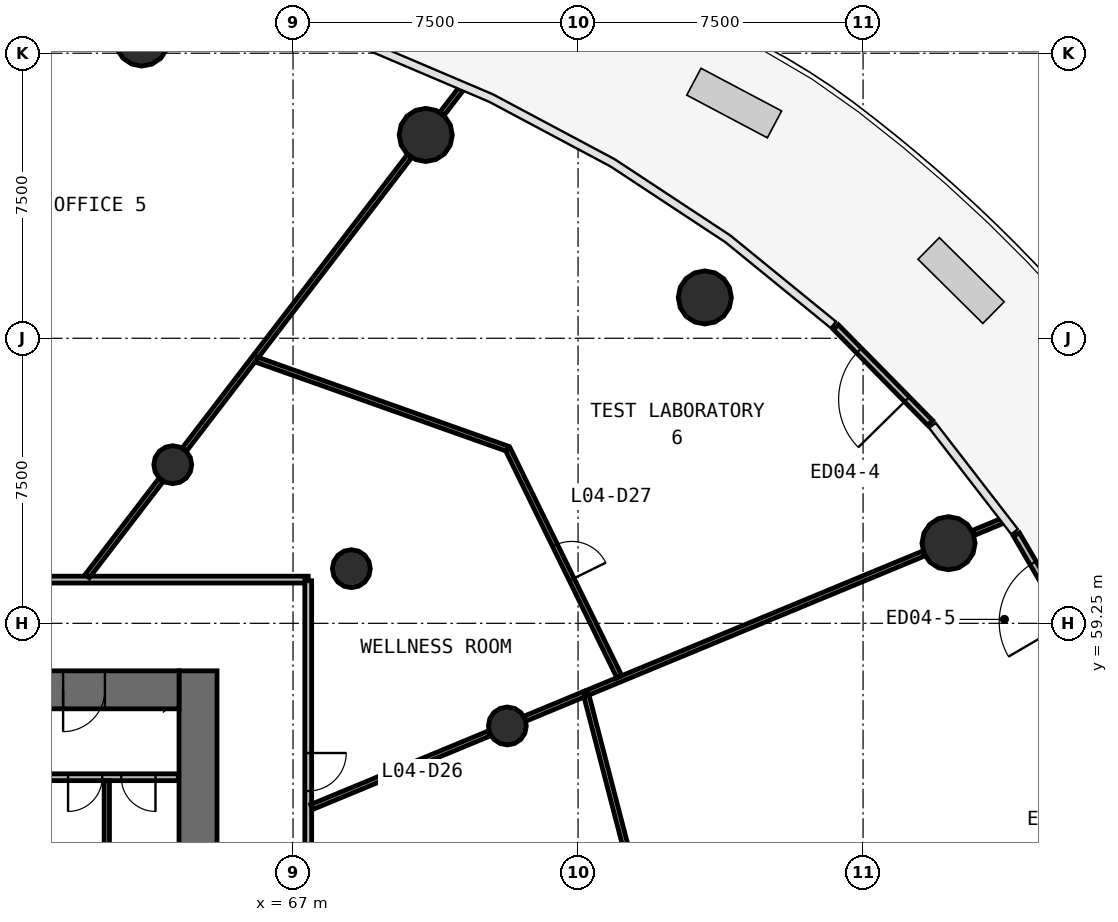
"""IFC4 building model, lengths in metres.
Left out: names, types, materials, properties, quantities, classifications, styles, units other than length and angle.
Written with IfcOpenShell. Run it as: python <this file> out.ifc"""

import sys

from ifc_helpers import new_model, si_unit, direction, frame, frame_2d, origin, origin_2d, place, context, subcontext, project, spatial, rectangle, circle, extrude, source, transform, mapped, element, fill, save


model = new_model("IFC4")
c1 = context("Model", 3, precision=1e-05, world=origin(), true_north=direction((0.0, 1.0)))
c2 = subcontext(c1, "Body", "Model", "MODEL_VIEW")
j1 = project(units=[si_unit("LENGTHUNIT", "METRE"), si_unit("PLANEANGLEUNIT", "RADIAN")], contexts=[c1])
p1 = place(None, origin())
s1 = spatial("IfcSite", under=j1, at=p1, CompositionType="ELEMENT")
p2 = place(p1, origin())
s2 = spatial("IfcBuilding", under=s1, at=p2, CompositionType="ELEMENT")
p3 = place(p2, frame((0.0, 0.0, 18.2)))
s3 = spatial("IfcBuildingStorey", under=s2, at=p3, CompositionType="ELEMENT", Elevation=18.2)
p4 = place(p3, frame((64.5, 38.0, 0.0), z_axis=(0.0, 0.0, 1.0), x_axis=(0.0, 1.0, 0.0)))
e1 = element("IfcWall", 1, at=p4, inside=s3, PredefinedType="SHEAR", context=c2, shape_type="SweptSolid", body=[
    extrude(rectangle(XDim=20.0, YDim=1.0, at=frame_2d((10.0, 0.0))), origin(), (0.0, 0.0, 1.0), 4.4),
])
p5 = place(p4, frame((9.1, 0.0, 0.0)))
e2 = element("IfcOpeningElement", 2, at=p5, cuts=e1, PredefinedType="OPENING", context=c2, shape_type="SweptSolid", body=[
    extrude(rectangle(XDim=1.8, YDim=2.1, at=frame_2d((0.9, 1.05))), frame((0.0, 0.51, 0.0), z_axis=(0.0, -1.0, 0.0), x_axis=(1.0, 0.0, 0.0)), (0.0, 0.0, 1.0), 1.02),
])
p6 = place(p3, frame((64.0, 57.5, 0.0), z_axis=(0.0, 0.0, 1.0), x_axis=(-1.0, 0.0, 0.0)))
e3 = element("IfcWall", 3, at=p6, inside=s3, PredefinedType="SHEAR", context=c2, shape_type="SweptSolid", body=[
    extrude(rectangle(XDim=24.0, YDim=1.0, at=frame_2d((12.0, 0.0))), origin(), (0.0, 0.0, 1.0), 4.4),
])
p7 = place(p6, frame((21.45, 0.0, 0.0)))
e4 = element("IfcOpeningElement", 4, at=p7, cuts=e3, PredefinedType="OPENING", context=c2, shape_type="SweptSolid", body=[
    extrude(rectangle(XDim=1.1, YDim=2.1, at=frame_2d((0.55, 1.05))), frame((0.0, 0.51, 0.0), z_axis=(0.0, -1.0, 0.0), x_axis=(1.0, 0.0, 0.0)), (0.0, 0.0, 1.0), 1.02),
])
p8 = place(p6, frame((1.95, 0.0, 0.0)))
e5 = element("IfcOpeningElement", 5, at=p8, cuts=e3, PredefinedType="OPENING", context=c2, shape_type="SweptSolid", body=[
    extrude(rectangle(XDim=1.1, YDim=2.1, at=frame_2d((0.55, 1.05))), frame((0.0, 0.51, 0.0), z_axis=(0.0, -1.0, 0.0), x_axis=(1.0, 0.0, 0.0)), (0.0, 0.0, 1.0), 1.02),
])
m1 = source(origin(), c2, "Body", "SweptSolid", [
    extrude(circle(Radius=0.7, at=origin_2d()), origin(), (0.0, 0.0, 1.0), 4.4),
])
for number, where, z_axis, x_axis in (
    (6, (84.249, 61.358, 0.0), (0.0, 0.0, 1.0), (1.0, 0.0, 0.0)),
    (7, (77.836, 67.824, 0.0), (0.0, 0.0, 1.0), (1.0, 0.0, 0.0)),
    (8, (70.492, 72.1, 0.0), (0.0, 0.0, 1.0), (1.0, 0.0, 0.0)),
    (9, (63.023, 74.611, 0.0), (0.0, 0.0, 1.0), (1.0, 0.0, 0.0)),
):
    element("IfcColumn", number, at=place(p3, frame(where, z_axis=z_axis, x_axis=x_axis)), inside=s3, PredefinedType="COLUMN", context=c2, shape_type="MappedRepresentation", body=[
        mapped(m1, transform((0.0, 0.0, 0.0), scale=1.0)),
    ])
m2 = source(origin(), c2, "Body", "SweptSolid", [
    extrude(circle(Radius=0.5, at=origin_2d()), origin(), (0.0, 0.0, 1.0), 4.4),
])
for number, where, z_axis, x_axis in (
    (10, (72.639, 56.549, 0.0), (0.0, 0.0, 1.0), (1.0, 0.0, 0.0)),
    (11, (68.535, 60.688, 0.0), (0.0, 0.0, 1.0), (1.0, 0.0, 0.0)),
    (12, (63.835, 63.424, 0.0), (0.0, 0.0, 1.0), (1.0, 0.0, 0.0)),
):
    element("IfcColumn", number, at=place(p3, frame(where, z_axis=z_axis, x_axis=x_axis)), inside=s3, PredefinedType="COLUMN", context=c2, shape_type="MappedRepresentation", body=[
        mapped(m2, transform((0.0, 0.0, 0.0), scale=1.0)),
    ])
p9 = place(p3, frame((87.819, 58.532, 0.0), z_axis=(0.0, 0.0, 1.0), x_axis=(-0.50395689343, 0.863728805566, 0.0)))
e13 = element("IfcWall", 13, at=p9, inside=s3, PredefinedType="STANDARD", context=c2, shape_type="SweptSolid", body=[
    extrude(rectangle(XDim=3.535, YDim=0.18, at=frame_2d((1.768, 0.0))), origin(), (0.0, 0.0, 1.0), 3.95),
])
p10 = place(p9, frame((0.868, 0.0, 0.0)))
e14 = element("IfcOpeningElement", 14, at=p10, cuts=e13, PredefinedType="OPENING", context=c2, shape_type="SweptSolid", body=[
    extrude(rectangle(XDim=1.8, YDim=2.4, at=frame_2d((0.9, 1.2))), frame((0.0, 0.1, 0.0), z_axis=(0.0, -1.0, 0.0), x_axis=(1.0, 0.0, 0.0)), (0.0, 0.0, 1.0), 0.2),
])
p11 = place(p3, frame((83.765, 64.525, 0.0), z_axis=(0.0, 0.0, 1.0), x_axis=(-0.701631219798, 0.712540266514, 0.0)))
e15 = element("IfcWall", 15, at=p11, inside=s3, PredefinedType="STANDARD", context=c2, shape_type="SweptSolid", body=[
    extrude(rectangle(XDim=3.536, YDim=0.18, at=frame_2d((1.768, 0.0))), origin(), (0.0, 0.0, 1.0), 3.95),
])
p12 = place(p11, frame((0.868, 0.0, 0.0)))
e16 = element("IfcOpeningElement", 16, at=p12, cuts=e15, PredefinedType="OPENING", context=c2, shape_type="SweptSolid", body=[
    extrude(rectangle(XDim=1.8, YDim=2.4, at=frame_2d((0.9, 1.2))), frame((0.0, 0.1, 0.0), z_axis=(0.0, -1.0, 0.0), x_axis=(1.0, 0.0, 0.0)), (0.0, 0.0, 1.0), 0.2),
])
p13 = place(p3, frame((36.6, 60.4, 0.0), z_axis=(0.0, 0.0, 1.0), x_axis=(1.0, 0.0, 0.0)))
e17 = element("IfcWall", 17, at=p13, inside=s3, PredefinedType="PARTITIONING", context=c2, shape_type="SweptSolid", body=[
    extrude(rectangle(XDim=30.8, YDim=0.18, at=frame_2d((15.4, 0.0))), origin(), (0.0, 0.0, 1.0), 3.15),
])
p14 = place(p13, frame((17.35, 0.0, 0.0)))
e18 = element("IfcOpeningElement", 18, at=p14, cuts=e17, PredefinedType="OPENING", context=c2, shape_type="SweptSolid", body=[
    extrude(rectangle(XDim=1.0, YDim=2.1, at=frame_2d((0.5, 1.05))), frame((0.0, 0.1, 0.0), z_axis=(0.0, -1.0, 0.0), x_axis=(1.0, 0.0, 0.0)), (0.0, 0.0, 1.0), 0.2),
])
p15 = place(p13, frame((14.85, 0.0, 0.0)))
e19 = element("IfcOpeningElement", 19, at=p15, cuts=e17, PredefinedType="OPENING", context=c2, shape_type="SweptSolid", body=[
    extrude(rectangle(XDim=0.9, YDim=2.1, at=frame_2d((0.45, 1.05))), frame((0.0, 0.1, 0.0), z_axis=(0.0, -1.0, 0.0), x_axis=(1.0, 0.0, 0.0)), (0.0, 0.0, 1.0), 0.2),
])
p16 = place(p13, frame((12.65, 0.0, 0.0)))
e20 = element("IfcOpeningElement", 20, at=p16, cuts=e17, PredefinedType="OPENING", context=c2, shape_type="SweptSolid", body=[
    extrude(rectangle(XDim=0.9, YDim=2.1, at=frame_2d((0.45, 1.05))), frame((0.0, 0.1, 0.0), z_axis=(0.0, -1.0, 0.0), x_axis=(1.0, 0.0, 0.0)), (0.0, 0.0, 1.0), 0.2),
])
p17 = place(p13, frame((8.95, 0.0, 0.0)))
e21 = element("IfcOpeningElement", 21, at=p17, cuts=e17, PredefinedType="OPENING", context=c2, shape_type="SweptSolid", body=[
    extrude(rectangle(XDim=1.0, YDim=2.1, at=frame_2d((0.5, 1.05))), frame((0.0, 0.1, 0.0), z_axis=(0.0, -1.0, 0.0), x_axis=(1.0, 0.0, 0.0)), (0.0, 0.0, 1.0), 0.2),
])
p18 = place(p3, frame((67.4, 60.37, 0.0), z_axis=(0.0, 0.0, 1.0), x_axis=(0.0, -1.0, 0.0)))
e22 = element("IfcWall", 22, at=p18, inside=s3, PredefinedType="PARTITIONING", context=c2, shape_type="SweptSolid", body=[
    extrude(rectangle(XDim=23.583, YDim=0.18, at=frame_2d((11.791, 0.0))), origin(), (0.0, 0.0, 1.0), 3.15),
])
p19 = place(p18, frame((11.333, 0.0, 0.0)))
e23 = element("IfcOpeningElement", 23, at=p19, cuts=e22, PredefinedType="OPENING", context=c2, shape_type="SweptSolid", body=[
    extrude(rectangle(XDim=1.0, YDim=2.1, at=frame_2d((0.5, 1.05))), frame((0.0, 0.1, 0.0), z_axis=(0.0, -1.0, 0.0), x_axis=(1.0, 0.0, 0.0)), (0.0, 0.0, 1.0), 0.2),
])
p20 = place(p18, frame((4.532, 0.0, 0.0)))
e24 = element("IfcOpeningElement", 24, at=p20, cuts=e22, PredefinedType="OPENING", context=c2, shape_type="SweptSolid", body=[
    extrude(rectangle(XDim=1.0, YDim=2.1, at=frame_2d((0.5, 1.05))), frame((0.0, 0.1, 0.0), z_axis=(0.0, -1.0, 0.0), x_axis=(1.0, 0.0, 0.0)), (0.0, 0.0, 1.0), 0.2),
])
p21 = place(p3, frame((63.98, 55.2, 0.0), z_axis=(0.0, 0.0, 1.0), x_axis=(-1.0, 0.0, 0.0)))
e25 = element("IfcWall", 25, at=p21, inside=s3, PredefinedType="PARTITIONING", context=c2, shape_type="SweptSolid", body=[
    extrude(rectangle(XDim=3.75, YDim=0.18, at=frame_2d((1.875, 0.0))), origin(), (0.0, 0.0, 1.0), 3.95),
])
p22 = place(p21, frame((2.0, 0.0, 0.0)))
e26 = element("IfcOpeningElement", 26, at=p22, cuts=e25, PredefinedType="OPENING", context=c2, shape_type="SweptSolid", body=[
    extrude(rectangle(XDim=0.9, YDim=2.1, at=frame_2d((0.45, 1.05))), frame((0.0, 0.1, 0.0), z_axis=(0.0, -1.0, 0.0), x_axis=(1.0, 0.0, 0.0)), (0.0, 0.0, 1.0), 0.2),
])
p23 = place(p21, frame((0.6, 0.0, 0.0)))
e27 = element("IfcOpeningElement", 27, at=p23, cuts=e25, PredefinedType="OPENING", context=c2, shape_type="SweptSolid", body=[
    extrude(rectangle(XDim=0.9, YDim=2.1, at=frame_2d((0.45, 1.05))), frame((0.0, 0.1, 0.0), z_axis=(0.0, -1.0, 0.0), x_axis=(1.0, 0.0, 0.0)), (0.0, 0.0, 1.0), 0.2),
])
p24 = place(p3, frame((70.064, 71.541, 0.0), z_axis=(0.0, 0.0, 1.0), x_axis=(-0.608770295053, -0.793346537057, 0.0)))
e28 = element("IfcWall", 28, at=p24, inside=s3, PredefinedType="PARTITIONING", context=c2, shape_type="SweptSolid", body=[
    extrude(rectangle(XDim=9.727, YDim=0.14, at=frame_2d((4.864, 0.0))), origin(), (0.0, 0.0, 1.0), 3.15),
])
p25 = place(p3, frame((74.704, 57.404, 0.0), z_axis=(0.0, 0.0, 1.0), x_axis=(0.923875564014, 0.382693013024, 0.0)))
e29 = element("IfcWall", 29, at=p25, inside=s3, PredefinedType="PARTITIONING", context=c2, shape_type="SweptSolid", body=[
    extrude(rectangle(XDim=9.626, YDim=0.14, at=frame_2d((4.813, 0.0))), origin(), (0.0, 0.0, 1.0), 3.15),
])
p26 = place(p3, frame((72.647, 63.843, 0.0), z_axis=(0.0, 0.0, 1.0), x_axis=(-0.942402239282, 0.33448171758, 0.0)))
e30 = element("IfcWall", 30, at=p26, inside=s3, PredefinedType="PARTITIONING", context=c2, shape_type="SweptSolid", body=[
    extrude(rectangle(XDim=7.007, YDim=0.14, at=frame_2d((3.503, 0.0))), origin(), (0.0, 0.0, 1.0), 3.15),
])
p27 = place(p3, frame((72.66, 63.816, 0.0), z_axis=(0.0, 0.0, 1.0), x_axis=(0.44010555344, -0.897946046169, 0.0)))
e31 = element("IfcWall", 31, at=p27, inside=s3, PredefinedType="PARTITIONING", context=c2, shape_type="SweptSolid", body=[
    extrude(rectangle(XDim=6.649, YDim=0.14, at=frame_2d((3.324, 0.0))), origin(), (0.0, 0.0, 1.0), 3.15),
])
p28 = place(p27, frame((2.799, 0.0, 0.0)))
e32 = element("IfcOpeningElement", 32, at=p28, cuts=e31, PredefinedType="OPENING", context=c2, shape_type="SweptSolid", body=[
    extrude(rectangle(XDim=1.0, YDim=2.1, at=frame_2d((0.5, 1.05))), frame((0.0, 0.08, 0.0), z_axis=(0.0, -1.0, 0.0), x_axis=(1.0, 0.0, 0.0)), (0.0, 0.0, 1.0), 0.16),
])
p29 = place(p3, frame((76.316, 51.201, 0.0), z_axis=(0.0, 0.0, 1.0), x_axis=(-0.251404417417, 0.967882130687, 0.0)))
e33 = element("IfcWall", 33, at=p29, inside=s3, PredefinedType="PARTITIONING", context=c2, shape_type="SweptSolid", body=[
    extrude(rectangle(XDim=6.379, YDim=0.14, at=frame_2d((3.189, 0.0))), origin(), (0.0, 0.0, 1.0), 3.15),
])
p30 = place(p3, frame((67.49, 54.416, 0.0), z_axis=(0.0, 0.0, 1.0), x_axis=(0.923890025086, 0.382658100067, 0.0)))
e34 = element("IfcWall", 34, at=p30, inside=s3, PredefinedType="PARTITIONING", context=c2, shape_type="SweptSolid", body=[
    extrude(rectangle(XDim=5.068, YDim=0.14, at=frame_2d((2.534, 0.0))), origin(), (0.0, 0.0, 1.0), 3.15),
])
p31 = place(p3, frame((61.584, 60.49, 0.0), z_axis=(0.0, 0.0, 1.0), x_axis=(0.60874605662, 0.793365135703, 0.0)))
e35 = element("IfcWall", 35, at=p31, inside=s3, PredefinedType="PARTITIONING", context=c2, shape_type="SweptSolid", body=[
    extrude(rectangle(XDim=3.194, YDim=0.14, at=frame_2d((1.597, 0.0))), origin(), (0.0, 0.0, 1.0), 3.15),
])
p32 = place(p3, frame((62.1, 52.4, 0.0), z_axis=(0.0, 0.0, 1.0), x_axis=(0.0, 1.0, 0.0)))
e36 = element("IfcWall", 36, at=p32, inside=s3, PredefinedType="PARTITIONING", context=c2, shape_type="SweptSolid", body=[
    extrude(rectangle(XDim=2.71, YDim=0.14, at=frame_2d((1.355, 0.0))), origin(), (0.0, 0.0, 1.0), 3.15),
])
p33 = place(p3, frame((73.106, 56.742, 0.0), z_axis=(0.0, 0.0, 1.0), x_axis=(0.923810256597, 0.38285063642, 0.0)))
e37 = element("IfcWall", 37, at=p33, inside=s3, PredefinedType="PARTITIONING", context=c2, shape_type="SweptSolid", body=[
    extrude(rectangle(XDim=1.7, YDim=0.14, at=frame_2d((0.85, 0.0))), origin(), (0.0, 0.0, 1.0), 3.15),
])
p34 = place(p3, frame((70.921, 72.658, 0.0), z_axis=(0.0, 0.0, 1.0), x_axis=(0.608939798959, 0.793216440351, 0.0)))
e38 = element("IfcWall", 38, at=p34, inside=s3, PredefinedType="PARTITIONING", context=c2, shape_type="SweptSolid", body=[
    extrude(rectangle(XDim=0.827, YDim=0.14, at=frame_2d((0.413, 0.0))), origin(), (0.0, 0.0, 1.0), 3.15),
])
p35 = place(p3, frame((84.9, 61.628, 0.0), z_axis=(0.0, 0.0, 1.0), x_axis=(0.923846977396, 0.382762017913, 0.0)))
e39 = element("IfcWall", 39, at=p35, inside=s3, PredefinedType="PARTITIONING", context=c2, shape_type="SweptSolid", body=[
    extrude(rectangle(XDim=0.823, YDim=0.14, at=frame_2d((0.412, 0.0))), origin(), (0.0, 0.0, 1.0), 3.15),
])
m3 = source(origin(), c2, "Body", "SweptSolid", [
    extrude(rectangle(XDim=1.8, YDim=2.4, at=frame_2d((0.9, 1.2))), frame((0.0, 0.025, 0.0), z_axis=(0.0, -1.0, 0.0), x_axis=(1.0, 0.0, 0.0)), (0.0, 0.0, 1.0), 0.05),
])
p36 = place(p10, origin())
e40 = element("IfcDoor", 40, at=p36, inside=s3, OperationType="DOUBLE_DOOR_SINGLE_SWING", PredefinedType="DOOR", context=c2, shape_type="MappedRepresentation", body=[
    mapped(m3, transform((0.0, 0.0, 0.0), scale=1.0)),
])
fill(e14, e40)
p37 = place(p12, origin())
e41 = element("IfcDoor", 41, at=p37, inside=s3, OperationType="DOUBLE_DOOR_SINGLE_SWING", PredefinedType="DOOR", context=c2, shape_type="MappedRepresentation", body=[
    mapped(m3, transform((0.0, 0.0, 0.0), scale=1.0)),
])
fill(e16, e41)
m4 = source(origin(), c2, "Body", "SweptSolid", [
    extrude(rectangle(XDim=1.1, YDim=2.1, at=frame_2d((0.55, 1.05))), frame((0.0, 0.025, 0.0), z_axis=(0.0, -1.0, 0.0), x_axis=(1.0, 0.0, 0.0)), (0.0, 0.0, 1.0), 0.05),
])
p38 = place(p8, origin())
e42 = element("IfcDoor", 42, at=p38, inside=s3, OperationType="SINGLE_SWING_RIGHT", PredefinedType="DOOR", context=c2, shape_type="MappedRepresentation", body=[
    mapped(m4, transform((0.0, 0.0, 0.0), scale=1.0)),
])
fill(e5, e42)
m5 = source(origin(), c2, "Body", "SweptSolid", [
    extrude(rectangle(XDim=1.0, YDim=2.1, at=frame_2d((0.5, 1.05))), frame((0.0, 0.025, 0.0), z_axis=(0.0, -1.0, 0.0), x_axis=(1.0, 0.0, 0.0)), (0.0, 0.0, 1.0), 0.05),
])
p39 = place(p20, origin())
e43 = element("IfcDoor", 43, at=p39, inside=s3, OperationType="SINGLE_SWING_LEFT", PredefinedType="DOOR", context=c2, shape_type="MappedRepresentation", body=[
    mapped(m5, transform((0.0, 0.0, 0.0), scale=1.0)),
])
fill(e24, e43)
p40 = place(p28, origin())
e44 = element("IfcDoor", 44, at=p40, inside=s3, OperationType="SINGLE_SWING_RIGHT", PredefinedType="DOOR", context=c2, shape_type="MappedRepresentation", body=[
    mapped(m5, transform((0.0, 0.0, 0.0), scale=1.0)),
])
fill(e32, e44)
m6 = source(origin(), c2, "Body", "SweptSolid", [
    extrude(rectangle(XDim=0.9, YDim=2.1, at=frame_2d((0.45, 1.05))), frame((0.0, 0.025, 0.0), z_axis=(0.0, -1.0, 0.0), x_axis=(1.0, 0.0, 0.0)), (0.0, 0.0, 1.0), 0.05),
])
p41 = place(p22, origin())
e45 = element("IfcDoor", 45, at=p41, inside=s3, OperationType="SINGLE_SWING_RIGHT", PredefinedType="DOOR", context=c2, shape_type="MappedRepresentation", body=[
    mapped(m6, transform((0.0, 0.0, 0.0), scale=1.0)),
])
fill(e26, e45)
p42 = place(p23, origin())
e46 = element("IfcDoor", 46, at=p42, inside=s3, OperationType="SINGLE_SWING_LEFT", PredefinedType="DOOR", context=c2, shape_type="MappedRepresentation", body=[
    mapped(m6, transform((0.0, 0.0, 0.0), scale=1.0)),
])
fill(e27, e46)
save(model, sys.argv[1])
